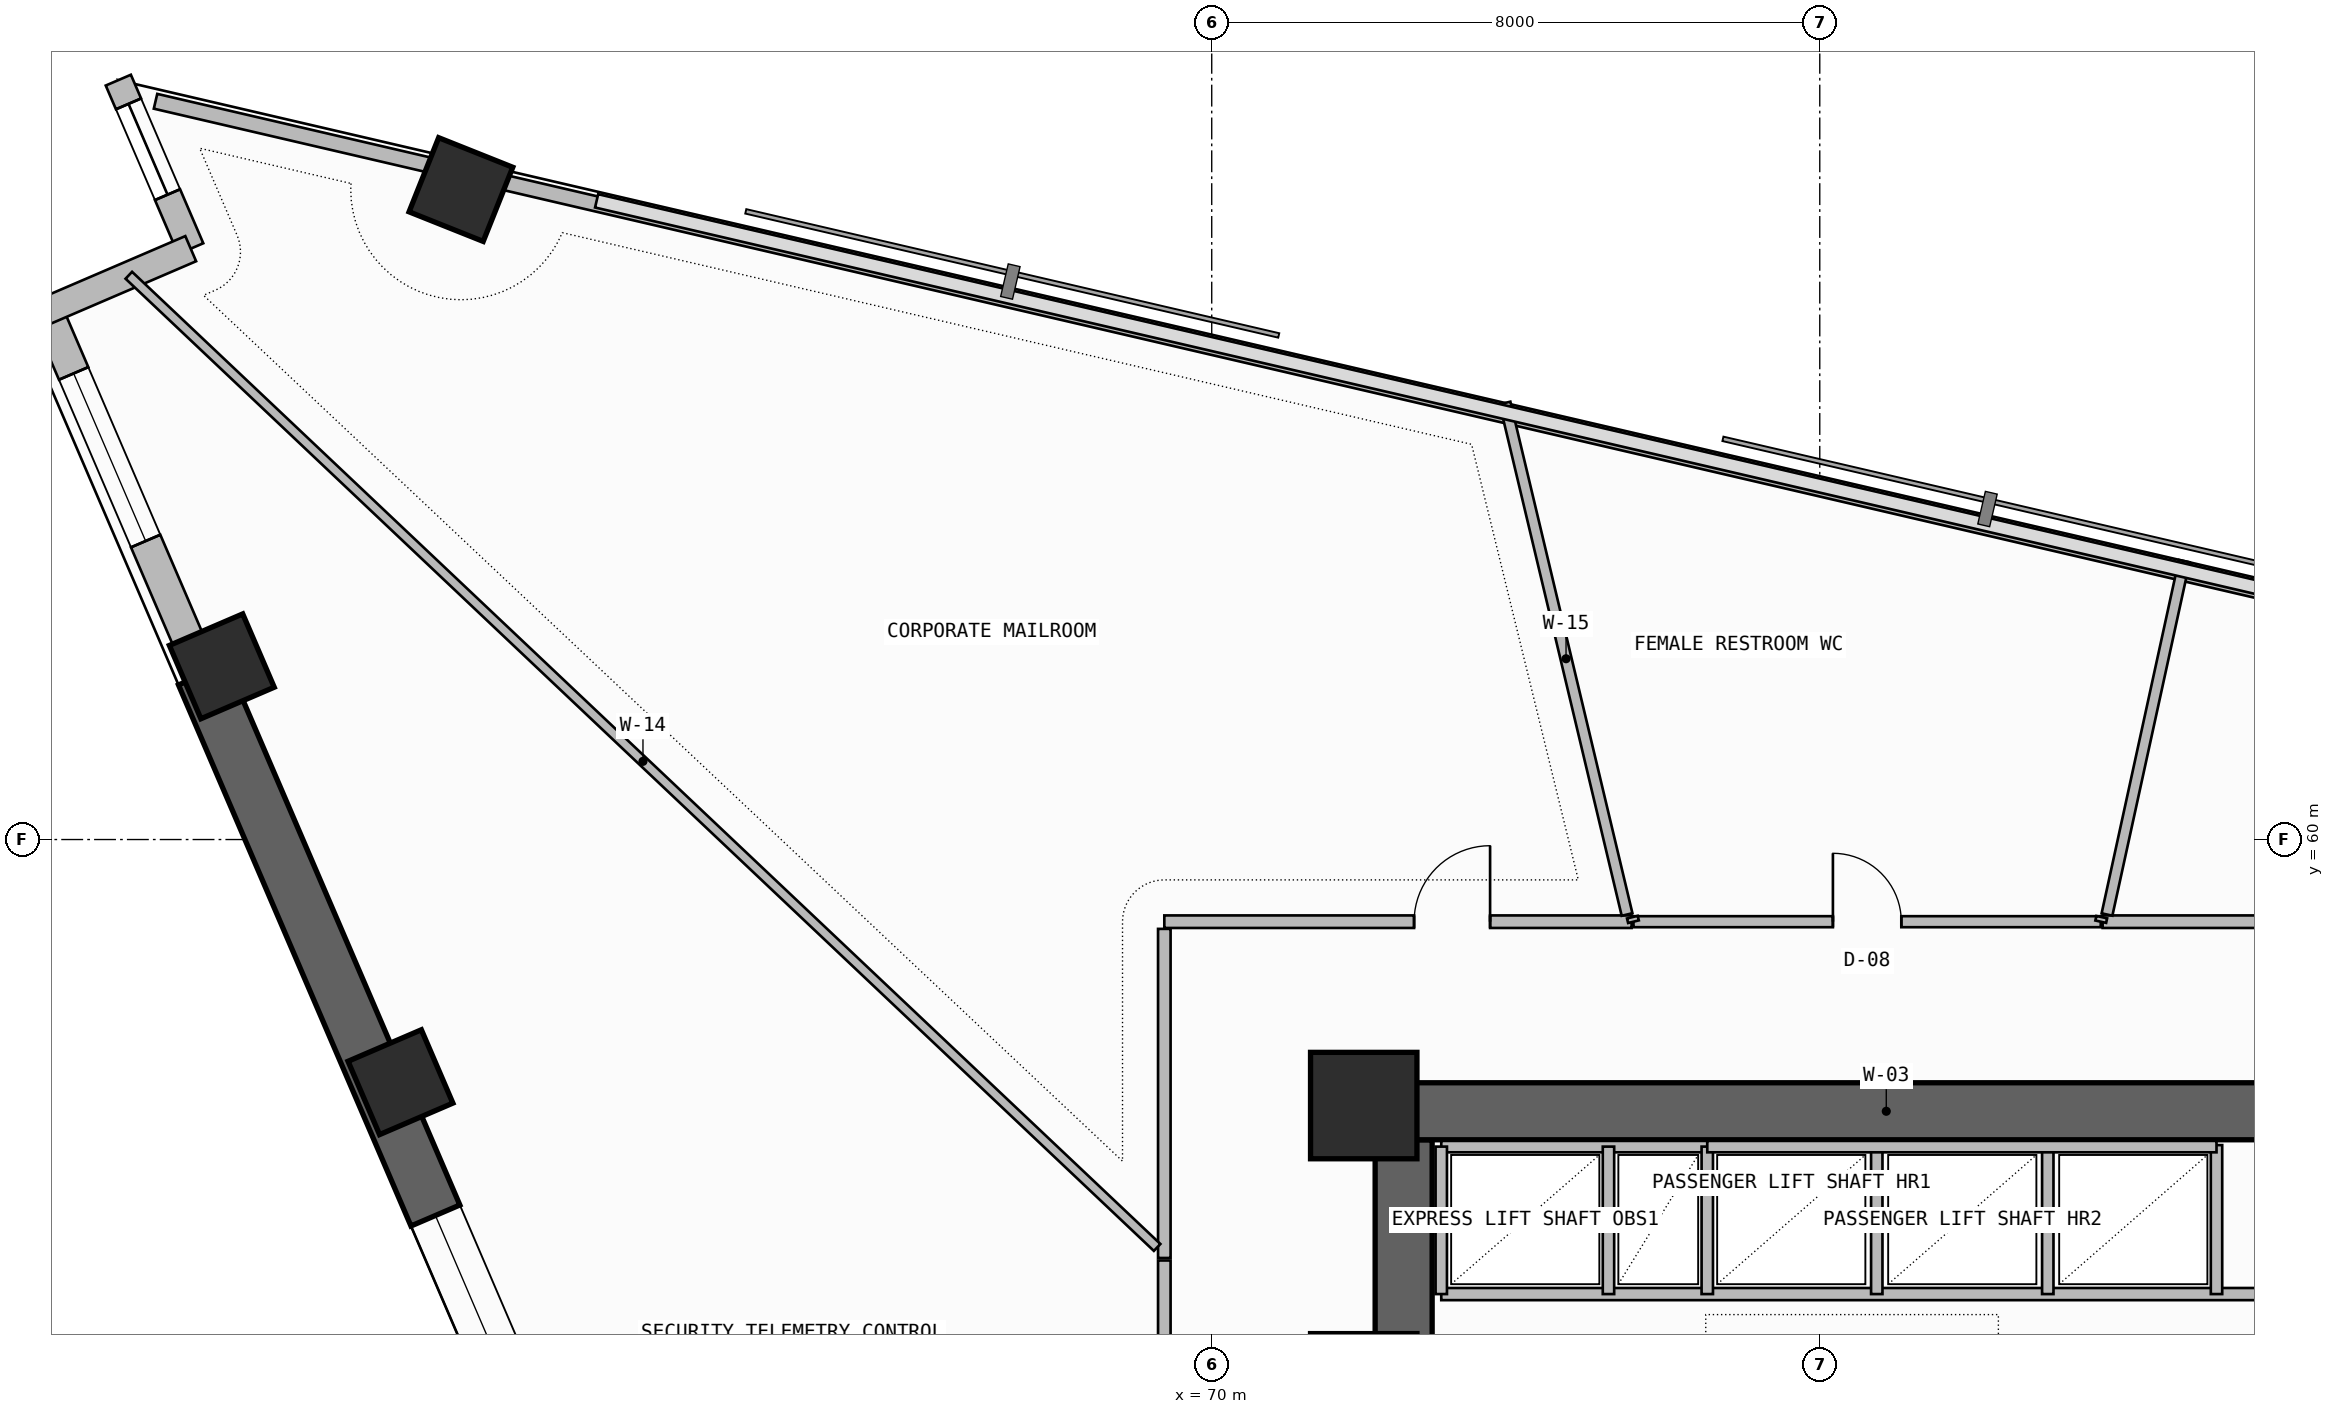
"""IFC4 building model, lengths in metres.
Left out: names, types, materials, properties, quantities, classifications, styles, units other than length and angle.
Written with IfcOpenShell. Run it as: python <this file> out.ifc"""

import sys

from ifc_helpers import new_model, si_unit, direction, frame, frame_2d, origin, origin_2d, place, context, subcontext, project, spatial, rectangle, extrude, element, fill, save


model = new_model("IFC4")
c1 = context("Model", 3, precision=1e-05, world=origin(), true_north=direction((0.0, 1.0)))
c2 = subcontext(c1, "Body", "Model", "MODEL_VIEW")
j1 = project(units=[si_unit("LENGTHUNIT", "METRE"), si_unit("PLANEANGLEUNIT", "RADIAN")], contexts=[c1])
p1 = place(None, origin())
s1 = spatial("IfcSite", under=j1, at=p1, CompositionType="ELEMENT")
p2 = place(p1, origin())
s2 = spatial("IfcBuilding", under=s1, at=p2, CompositionType="ELEMENT")
p3 = place(p2, frame((0.0, 0.0, 186.14)))
s3 = spatial("IfcBuildingStorey", under=s2, at=p3, CompositionType="ELEMENT", Elevation=186.14)
p4 = place(p3, frame((72.525, 43.35, -0.26), z_axis=(0.0, 0.0, 1.0), x_axis=(0.0, 1.0, 0.0)))
e1 = element("IfcWall", 1, at=p4, inside=s3, PredefinedType="SHEAR", context=c2, shape_type="SweptSolid", body=[
    extrude(rectangle(XDim=12.7, YDim=0.75, at=frame_2d((6.35, 0.0))), origin(), (0.0, 0.0, 1.0), 3.52),
])
p5 = place(p4, frame((1.35, 0.0, 0.26)))
e2 = element("IfcOpeningElement", 2, at=p5, cuts=e1, PredefinedType="OPENING", context=c2, shape_type="SweptSolid", body=[
    extrude(rectangle(XDim=1.2, YDim=2.2, at=frame_2d((0.6, 1.1))), frame((0.0, 0.385, 0.0), z_axis=(0.0, -1.0, 0.0), x_axis=(1.0, 0.0, 0.0)), (0.0, 0.0, 1.0), 0.77),
])
p6 = place(p3, frame((72.0, 56.425, -0.26), z_axis=(0.0, 0.0, 1.0), x_axis=(1.0, 0.0, 0.0)))
e3 = element("IfcWall", 3, at=p6, inside=s3, PredefinedType="SHEAR", context=c2, shape_type="SweptSolid", body=[
    extrude(rectangle(XDim=13.75, YDim=0.75, at=frame_2d((6.875, 0.0))), origin(), (0.0, 0.0, 1.0), 3.52),
])
for number, where, z_axis, x_axis in (
    (4, (72.0, 52.8, 0.0), (0.0, 0.0, 1.0), (1.0, 0.0, 0.0)),
    (5, (72.0, 56.5, 0.0), (0.0, 0.0, 1.0), (1.0, 0.0, 0.0)),
):
    element("IfcColumn", number, at=place(p3, frame(where, z_axis=z_axis, x_axis=x_axis)), inside=s3, PredefinedType="COLUMN", context=c2, shape_type="SweptSolid", body=[
        extrude(rectangle(XDim=1.4, YDim=1.4, at=origin_2d()), origin(), (0.0, 0.0, 1.0), 3.52),
    ])
for number, where, z_axis, x_axis in (
    (6, (60.122, 68.551, 0.0), (0.0, 0.0, 1.0), (0.371, 0.929, 0.0)),
    (7, (56.976, 62.279, 0.0), (0.0, 0.0, 1.0), (-0.395, 0.919, 0.0)),
    (8, (59.326, 56.807, 0.0), (0.0, 0.0, 1.0), (-0.395, 0.919, 0.0)),
):
    element("IfcColumn", number, at=place(p3, frame(where, z_axis=z_axis, x_axis=x_axis)), inside=s3, PredefinedType="COLUMN", context=c2, shape_type="SweptSolid", body=[
        extrude(rectangle(XDim=1.05, YDim=1.05, at=origin_2d()), origin(), (0.0, 0.0, 1.0), 3.52),
    ])
p7 = place(p3, frame((54.671, 66.959, 0.0), z_axis=(0.0, 0.0, 1.0), x_axis=(0.394733507229, -0.918795656428, 0.0)))
e9 = element("IfcWall", 9, at=p7, inside=s3, PredefinedType="SOLIDWALL", context=c2, shape_type="SweptSolid", body=[
    extrude(rectangle(XDim=5.21, YDim=0.42, at=frame_2d((2.605, 0.0))), origin(), (0.0, 0.0, 1.0), 2.645),
])
p8 = place(p7, frame((0.9, 0.0, 1.2)))
e10 = element("IfcOpeningElement", 10, at=p8, cuts=e9, PredefinedType="OPENING", context=c2, shape_type="SweptSolid", body=[
    extrude(rectangle(XDim=2.4, YDim=0.9, at=frame_2d((1.2, 0.45))), frame((0.0, 0.22, 0.0), z_axis=(0.0, -1.0, 0.0), x_axis=(1.0, 0.0, 0.0)), (0.0, 0.0, 1.0), 0.44),
])
p9 = place(p3, frame((56.728, 62.172, -0.26), z_axis=(0.0, 0.0, 1.0), x_axis=(0.394736752992, -0.918794261974, 0.0)))
e11 = element("IfcWall", 11, at=p9, inside=s3, PredefinedType="SHEAR", context=c2, shape_type="SweptSolid", body=[
    extrude(rectangle(XDim=19.353, YDim=0.7, at=frame_2d((9.676, 0.0))), origin(), (0.0, 0.0, 1.0), 3.52),
])
p10 = place(p9, frame((7.747, 0.0, 1.2)))
e12 = element("IfcOpeningElement", 12, at=p10, cuts=e11, PredefinedType="OPENING", context=c2, shape_type="SweptSolid", body=[
    extrude(rectangle(XDim=2.4, YDim=0.9, at=frame_2d((1.2, 0.45))), frame((0.0, 0.36, 0.0), z_axis=(0.0, -1.0, 0.0), x_axis=(1.0, 0.0, 0.0)), (0.0, 0.0, 1.0), 0.72),
])
p11 = place(p3, frame((55.614, 69.991, 0.0), z_axis=(0.0, 0.0, 1.0), x_axis=(0.394663989422, -0.918825519592, 0.0)))
e13 = element("IfcWall", 13, at=p11, inside=s3, PredefinedType="SOLIDWALL", context=c2, shape_type="SweptSolid", body=[
    extrude(rectangle(XDim=2.413, YDim=0.36, at=frame_2d((1.207, 0.0))), origin(), (0.0, 0.0, 1.0), 3.26),
])
p12 = place(p11, frame((0.34, 0.0, 0.45)))
e14 = element("IfcOpeningElement", 14, at=p12, cuts=e13, PredefinedType="OPENING", context=c2, shape_type="SweptSolid", body=[
    extrude(rectangle(XDim=1.3, YDim=2.4, at=frame_2d((0.65, 1.2))), frame((0.0, 0.19, 0.0), z_axis=(0.0, -1.0, 0.0), x_axis=(1.0, 0.0, 0.0)), (0.0, 0.0, 1.0), 0.38),
])
p13 = place(p3, frame((56.566, 67.773, 0.0), z_axis=(0.0, 0.0, 1.0), x_axis=(-0.918788830096, -0.394749396062, 0.0)))
e15 = element("IfcWall", 15, at=p13, inside=s3, PredefinedType="SOLIDWALL", context=c2, shape_type="SweptSolid", body=[
    extrude(rectangle(XDim=2.413, YDim=0.36, at=frame_2d((1.207, 0.0))), origin(), (0.0, 0.0, 1.0), 3.26),
])
p14 = place(p3, frame((87.165, 62.482, 0.0), z_axis=(0.0, 0.0, 1.0), x_axis=(-0.973958631559, 0.226725790352, 0.0)))
e16 = element("IfcWall", 16, at=p14, inside=s3, PredefinedType="PARAPET", context=c2, shape_type="SweptSolid", body=[
    extrude(rectangle(XDim=27.376, YDim=0.2, at=frame_2d((13.688, 0.0))), origin(), (0.0, 0.0, 1.0), 1.15),
])
p15 = place(p3, frame((59.841, 68.843, 0.0), z_axis=(0.0, 0.0, 1.0), x_axis=(-0.973951848941, 0.226754924851, 0.0)))
e17 = element("IfcWall", 17, at=p15, inside=s3, PredefinedType="PARAPET", context=c2, shape_type="SweptSolid", body=[
    extrude(rectangle(XDim=3.837, YDim=0.2, at=frame_2d((1.918, 0.0))), origin(), (0.0, 0.0, 1.0), 1.15),
])
p16 = place(p3, frame((73.02, 54.02, 0.0), z_axis=(0.0, 0.0, 1.0), x_axis=(1.0, 0.0, 0.0)))
e18 = element("IfcWall", 18, at=p16, inside=s3, PredefinedType="SOLIDWALL", context=c2, shape_type="SweptSolid", body=[
    extrude(rectangle(XDim=12.08, YDim=0.16, at=frame_2d((6.04, 0.0))), origin(), (0.0, 0.0, 1.0), 3.26),
])
p17 = place(p3, frame((73.02, 55.96, 0.0), z_axis=(0.0, 0.0, 1.0), x_axis=(1.0, 0.0, 0.0)))
e19 = element("IfcWall", 19, at=p17, inside=s3, PredefinedType="SOLIDWALL", context=c2, shape_type="SweptSolid", body=[
    extrude(rectangle(XDim=3.5, YDim=0.15, at=frame_2d((1.75, 0.0))), origin(), (0.0, 0.0, 1.0), 3.26),
])
p18 = place(p3, frame((73.02, 54.02, 0.0), z_axis=(0.0, 0.0, 1.0), x_axis=(0.0, 1.0, 0.0)))
e20 = element("IfcWall", 20, at=p18, inside=s3, PredefinedType="PLUMBINGWALL", context=c2, shape_type="SweptSolid", body=[
    extrude(rectangle(XDim=1.94, YDim=0.15, at=frame_2d((0.97, 0.0))), origin(), (0.0, 0.0, 1.0), 3.26),
])
p19 = place(p3, frame((76.52, 54.02, 0.0), z_axis=(0.0, 0.0, 1.0), x_axis=(0.0, 1.0, 0.0)))
e21 = element("IfcWall", 21, at=p19, inside=s3, PredefinedType="SOLIDWALL", context=c2, shape_type="SweptSolid", body=[
    extrude(rectangle(XDim=1.94, YDim=0.15, at=frame_2d((0.97, 0.0))), origin(), (0.0, 0.0, 1.0), 3.26),
])
p20 = place(p3, frame((75.22, 54.02, 0.0), z_axis=(0.0, 0.0, 1.0), x_axis=(0.0, 1.0, 0.0)))
e22 = element("IfcWall", 22, at=p20, inside=s3, PredefinedType="PLUMBINGWALL", context=c2, shape_type="SweptSolid", body=[
    extrude(rectangle(XDim=1.94, YDim=0.15, at=frame_2d((0.97, 0.0))), origin(), (0.0, 0.0, 1.0), 3.26),
])
for number, where, z_axis, x_axis in (
    (23, (78.75, 54.02, 0.0), (0.0, 0.0, 1.0), (0.0, 1.0, 0.0)),
    (24, (81.0, 54.02, 0.0), (0.0, 0.0, 1.0), (0.0, 1.0, 0.0)),
):
    element("IfcWall", number, at=place(p3, frame(where, z_axis=z_axis, x_axis=x_axis)), inside=s3, PredefinedType="PLUMBINGWALL", context=c2, shape_type="SweptSolid", body=[
        extrude(rectangle(XDim=1.96, YDim=0.15, at=frame_2d((0.98, 0.0))), origin(), (0.0, 0.0, 1.0), 3.26),
    ])
p21 = place(p3, frame((83.22, 54.02, 0.0), z_axis=(0.0, 0.0, 1.0), x_axis=(0.0, 1.0, 0.0)))
e25 = element("IfcWall", 25, at=p21, inside=s3, PredefinedType="SOLIDWALL", context=c2, shape_type="SweptSolid", body=[
    extrude(rectangle(XDim=1.96, YDim=0.15, at=frame_2d((0.98, 0.0))), origin(), (0.0, 0.0, 1.0), 3.26),
])
p22 = place(p3, frame((76.52, 55.96, 0.0), z_axis=(0.0, 0.0, 1.0), x_axis=(1.0, 0.0, 0.0)))
e26 = element("IfcWall", 26, at=p22, inside=s3, PredefinedType="SOLIDWALL", context=c2, shape_type="SweptSolid", body=[
    extrude(rectangle(XDim=6.7, YDim=0.15, at=frame_2d((3.35, 0.0))), origin(), (0.0, 0.0, 1.0), 3.26),
])
p23 = place(p3, frame((94.074, 58.919, 0.0), z_axis=(0.0, 0.0, 1.0), x_axis=(-1.0, 0.0, 0.0)))
e27 = element("IfcWall", 27, at=p23, inside=s3, PredefinedType="PARTITIONING", context=c2, shape_type="SweptSolid", body=[
    extrude(rectangle(XDim=12.352, YDim=0.165, at=frame_2d((6.176, 0.0))), origin(), (0.0, 0.0, 1.0), 2.645),
])
p24 = place(p23, frame((1.514, 0.0, 0.0)))
e28 = element("IfcOpeningElement", 28, at=p24, cuts=e27, PredefinedType="OPENING", context=c2, shape_type="SweptSolid", body=[
    extrude(rectangle(XDim=1.0, YDim=2.2, at=frame_2d((0.5, 1.1))), frame((0.0, 0.093, 0.0), z_axis=(0.0, -1.0, 0.0), x_axis=(1.0, 0.0, 0.0)), (0.0, 0.0, 1.0), 0.185),
])
p25 = place(p3, frame((81.779, 59.013, 0.0), z_axis=(0.0, 0.0, 1.0), x_axis=(0.213583679224, 0.976924772933, 0.0)))
e29 = element("IfcWall", 29, at=p25, inside=s3, PredefinedType="PARTITIONING", context=c2, shape_type="SweptSolid", body=[
    extrude(rectangle(XDim=4.76, YDim=0.145, at=frame_2d((2.38, 0.0))), origin(), (0.0, 0.0, 1.0), 3.26),
])
p26 = place(p3, frame((75.524, 58.919, 0.0), z_axis=(0.0, 0.0, 1.0), x_axis=(-1.0, 0.0, 0.0)))
e30 = element("IfcWall", 30, at=p26, inside=s3, PredefinedType="PARTITIONING", context=c2, shape_type="SweptSolid", body=[
    extrude(rectangle(XDim=6.148, YDim=0.165, at=frame_2d((3.074, 0.0))), origin(), (0.0, 0.0, 1.0), 2.745),
])
p27 = place(p26, frame((1.862, 0.0, 0.0)))
e31 = element("IfcOpeningElement", 31, at=p27, cuts=e30, PredefinedType="OPENING", context=c2, shape_type="SweptSolid", body=[
    extrude(rectangle(XDim=1.0, YDim=2.2, at=frame_2d((0.5, 1.1))), frame((0.0, 0.093, 0.0), z_axis=(0.0, -1.0, 0.0), x_axis=(1.0, 0.0, 0.0)), (0.0, 0.0, 1.0), 0.185),
])
p28 = place(p3, frame((69.376, 58.824, 0.0), z_axis=(0.0, 0.0, 1.0), x_axis=(0.0, -1.0, 0.0)))
e32 = element("IfcWall", 32, at=p28, inside=s3, PredefinedType="PARTITIONING", context=c2, shape_type="SweptSolid", body=[
    extrude(rectangle(XDim=4.33, YDim=0.165, at=frame_2d((2.165, 0.0))), origin(), (0.0, 0.0, 1.0), 2.745),
])
p29 = place(p3, frame((73.859, 65.744, 0.0), z_axis=(0.0, 0.0, 1.0), x_axis=(0.232068908896, -0.972699347961, 0.0)))
e33 = element("IfcWall", 33, at=p29, inside=s3, PredefinedType="PARTITIONING", context=c2, shape_type="SweptSolid", body=[
    extrude(rectangle(XDim=6.919, YDim=0.145, at=frame_2d((3.459, 0.0))), origin(), (0.0, 0.0, 1.0), 3.26),
])
p30 = place(p3, frame((69.282, 54.634, 0.0), z_axis=(0.0, 0.0, 1.0), x_axis=(-0.726693785238, 0.686961529125, 0.0)))
e34 = element("IfcWall", 34, at=p30, inside=s3, PredefinedType="PARTITIONING", context=c2, shape_type="SweptSolid", body=[
    extrude(rectangle(XDim=18.618, YDim=0.125, at=frame_2d((9.309, 0.0))), origin(), (0.0, 0.0, 1.0), 2.645),
])
p31 = place(p3, frame((81.697, 58.919, 0.0), z_axis=(0.0, 0.0, 1.0), x_axis=(-1.0, 0.0, 0.0)))
e35 = element("IfcWall", 35, at=p31, inside=s3, PredefinedType="PARTITIONING", context=c2, shape_type="SweptSolid", body=[
    extrude(rectangle(XDim=6.148, YDim=0.145, at=frame_2d((3.074, 0.0))), origin(), (0.0, 0.0, 1.0), 3.26),
])
p32 = place(p31, frame((2.624, 0.0, 0.0)))
e36 = element("IfcOpeningElement", 36, at=p32, cuts=e35, PredefinedType="OPENING", context=c2, shape_type="SweptSolid", body=[
    extrude(rectangle(XDim=0.9, YDim=2.1, at=frame_2d((0.45, 1.05))), frame((0.0, 0.083, 0.0), z_axis=(0.0, -1.0, 0.0), x_axis=(1.0, 0.0, 0.0)), (0.0, 0.0, 1.0), 0.165),
])
p33 = place(p3, frame((75.549, 58.919, 0.0), z_axis=(0.0, 0.0, 1.0), x_axis=(-0.236956180191, 0.971520338783, 0.0)))
e37 = element("IfcWall", 37, at=p33, inside=s3, PredefinedType="PARTITIONING", context=c2, shape_type="SweptSolid", body=[
    extrude(rectangle(XDim=0.062, YDim=0.145, at=frame_2d((0.031, 0.0))), origin(), (0.0, 0.0, 1.0), 3.26),
])
p34 = place(p3, frame((81.71, 58.979, 0.0), z_axis=(0.0, 0.0, 1.0), x_axis=(-0.214407294843, -0.976744343172, 0.0)))
e38 = element("IfcWall", 38, at=p34, inside=s3, PredefinedType="PARTITIONING", context=c2, shape_type="SweptSolid", body=[
    extrude(rectangle(XDim=0.062, YDim=0.145, at=frame_2d((0.031, 0.0))), origin(), (0.0, 0.0, 1.0), 3.26),
])
p35 = place(p3, frame((69.376, 54.462, 0.0), z_axis=(0.0, 0.0, 1.0), x_axis=(0.0, -1.0, 0.0)))
e39 = element("IfcWall", 39, at=p35, inside=s3, PredefinedType="PARTITIONING", context=c2, shape_type="SweptSolid", body=[
    extrude(rectangle(XDim=8.312, YDim=0.165, at=frame_2d((4.156, 0.0))), origin(), (0.0, 0.0, 1.0), 2.745),
])
p36 = place(p35, frame((3.656, 0.0, 0.0)))
e40 = element("IfcOpeningElement", 40, at=p36, cuts=e39, PredefinedType="OPENING", context=c2, shape_type="SweptSolid", body=[
    extrude(rectangle(XDim=1.0, YDim=2.2, at=frame_2d((0.5, 1.1))), frame((0.0, 0.093, 0.0), z_axis=(0.0, -1.0, 0.0), x_axis=(1.0, 0.0, 0.0)), (0.0, 0.0, 1.0), 0.185),
])
p37 = place(p8, origin())
e41 = element("IfcWindow", 41, at=p37, inside=s3, PartitioningType="SINGLE_PANEL", PredefinedType="WINDOW", context=c2, shape_type="SweptSolid", body=[
    extrude(rectangle(XDim=2.4, YDim=0.9, at=frame_2d((1.2, 0.45))), frame((0.0, 0.03, 0.0), z_axis=(0.0, -1.0, 0.0), x_axis=(1.0, 0.0, 0.0)), (0.0, 0.0, 1.0), 0.06),
])
fill(e10, e41)
p38 = place(p10, origin())
e42 = element("IfcWindow", 42, at=p38, inside=s3, PartitioningType="SINGLE_PANEL", PredefinedType="WINDOW", context=c2, shape_type="SweptSolid", body=[
    extrude(rectangle(XDim=2.4, YDim=0.9, at=frame_2d((1.2, 0.45))), frame((0.0, 0.03, 0.0), z_axis=(0.0, -1.0, 0.0), x_axis=(1.0, 0.0, 0.0)), (0.0, 0.0, 1.0), 0.06),
])
fill(e12, e42)
p39 = place(p12, origin())
e43 = element("IfcWindow", 43, at=p39, inside=s3, PartitioningType="SINGLE_PANEL", PredefinedType="WINDOW", context=c2, shape_type="SweptSolid", body=[
    extrude(rectangle(XDim=1.3, YDim=2.4, at=frame_2d((0.65, 1.2))), frame((0.0, 0.03, 0.0), z_axis=(0.0, -1.0, 0.0), x_axis=(1.0, 0.0, 0.0)), (0.0, 0.0, 1.0), 0.06),
])
fill(e14, e43)
p40 = place(p27, frame((1.0, 0.0, 0.0), z_axis=(0.0, 0.0, 1.0), x_axis=(-1.0, 0.0, 0.0)))
e44 = element("IfcDoor", 44, at=p40, inside=s3, OperationType="SINGLE_SWING_RIGHT", PredefinedType="DOOR", context=c2, shape_type="SweptSolid", body=[
    extrude(rectangle(XDim=1.0, YDim=2.2, at=frame_2d((0.5, 1.1))), frame((0.0, 0.025, 0.0), z_axis=(0.0, -1.0, 0.0), x_axis=(1.0, 0.0, 0.0)), (0.0, 0.0, 1.0), 0.05),
])
fill(e31, e44)
p41 = place(p32, frame((0.9, 0.0, 0.0), z_axis=(0.0, 0.0, 1.0), x_axis=(-1.0, 0.0, 0.0)))
e45 = element("IfcDoor", 45, at=p41, inside=s3, OperationType="SINGLE_SWING_LEFT", PredefinedType="DOOR", context=c2, shape_type="SweptSolid", body=[
    extrude(rectangle(XDim=0.9, YDim=2.1, at=frame_2d((0.45, 1.05))), frame((0.0, 0.025, 0.0), z_axis=(0.0, -1.0, 0.0), x_axis=(1.0, 0.0, 0.0)), (0.0, 0.0, 1.0), 0.05),
])
fill(e36, e45)
save(model, sys.argv[1])
